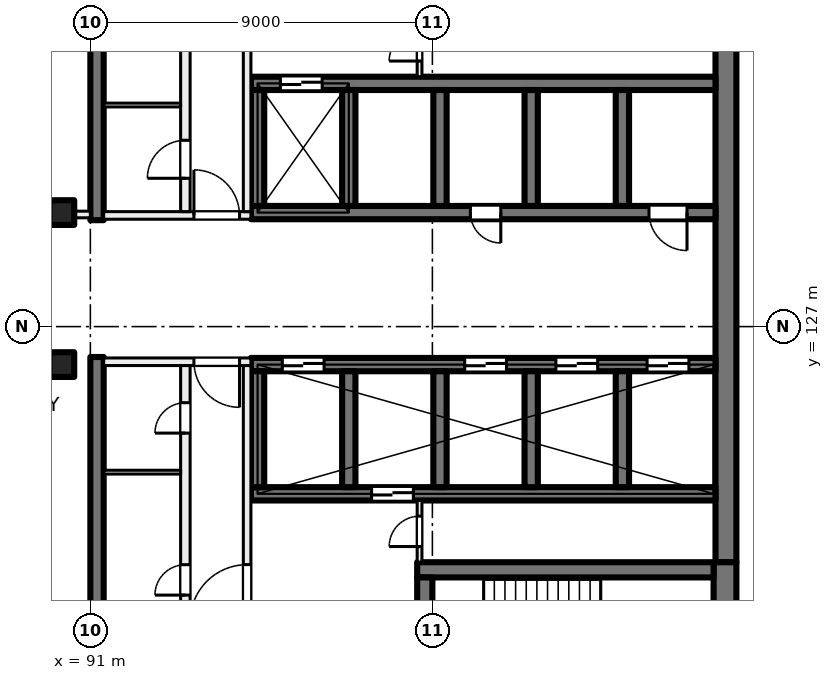
"""IFC4 building model, lengths in metres.
Left out: names, types, materials, properties, quantities, classifications, styles, units other than length and angle.
Written with IfcOpenShell. Run it as: python <this file> out.ifc"""

import sys

from ifc_helpers import new_model, si_unit, direction, frame, frame_2d, origin, origin_2d, place, context, subcontext, project, spatial, rectangle, extrude, element, fill, save


model = new_model("IFC4")
c1 = context("Model", 3, precision=1e-05, world=origin(), true_north=direction((0.0, 1.0)))
c2 = subcontext(c1, "Body", "Model", "MODEL_VIEW")
j1 = project(units=[si_unit("LENGTHUNIT", "METRE"), si_unit("PLANEANGLEUNIT", "RADIAN")], contexts=[c1])
p1 = place(None, origin())
s1 = spatial("IfcSite", under=j1, at=p1, CompositionType="ELEMENT")
p2 = place(p1, origin())
s2 = spatial("IfcBuilding", under=s1, at=p2, CompositionType="ELEMENT")
p3 = place(p2, frame((0.0, 0.0, 178.5)))
s3 = spatial("IfcBuildingStorey", under=s2, at=p3, CompositionType="ELEMENT", Elevation=178.5)
for number, where, z_axis, x_axis in (
    (1, (90.25, 130.0, 0.0), (0.0, 0.0, 1.0), (1.0, 0.0, 0.0)),
    (2, (90.25, 126.0, 0.0), (0.0, 0.0, 1.0), (1.0, 0.0, 0.0)),
):
    element("IfcColumn", number, at=place(p3, frame(where, z_axis=z_axis, x_axis=x_axis)), inside=s3, PredefinedType="COLUMN", context=c2, shape_type="SweptSolid", body=[
        extrude(rectangle(XDim=0.65, YDim=0.65, at=origin_2d()), origin(), (0.0, 0.0, 1.0), 4.0),
    ])
p4 = place(p3, frame((107.725, 135.2, 0.0), z_axis=(0.0, 0.0, 1.0), x_axis=(0.0, -1.0, 0.0)))
e3 = element("IfcWall", 3, at=p4, inside=s3, PredefinedType="SHEAR", context=c2, shape_type="SweptSolid", body=[
    extrude(rectangle(XDim=14.4, YDim=0.55, at=frame_2d((7.2, 0.0))), origin(), (0.0, 0.0, 1.0), 4.0),
])
p5 = place(p3, frame((107.7, 120.8, 0.0), z_axis=(0.0, 0.0, 1.0), x_axis=(0.0, -1.0, 0.0)))
e4 = element("IfcWall", 4, at=p5, inside=s3, PredefinedType="SHEAR", context=c2, shape_type="SweptSolid", body=[
    extrude(rectangle(XDim=3.8, YDim=0.6, at=frame_2d((1.9, 0.0))), origin(), (0.0, 0.0, 1.0), 4.0),
])
p6 = place(p3, frame((107.4, 120.6, 0.0), z_axis=(0.0, 0.0, 1.0), x_axis=(-1.0, 0.0, 0.0)))
e5 = element("IfcWall", 5, at=p6, inside=s3, PredefinedType="SHEAR", context=c2, shape_type="SweptSolid", body=[
    extrude(rectangle(XDim=7.8, YDim=0.4, at=frame_2d((3.9, 0.0))), origin(), (0.0, 0.0, 1.0), 4.0),
])
p7 = place(p3, frame((99.8, 120.4, 0.0), z_axis=(0.0, 0.0, 1.0), x_axis=(0.0, -1.0, 0.0)))
e6 = element("IfcWall", 6, at=p7, inside=s3, PredefinedType="SHEAR", context=c2, shape_type="SweptSolid", body=[
    extrude(rectangle(XDim=2.8, YDim=0.4, at=frame_2d((1.4, 0.0))), origin(), (0.0, 0.0, 1.0), 4.0),
])
p8 = place(p7, frame((0.925, 0.0, 0.0)))
e7 = element("IfcOpeningElement", 7, at=p8, cuts=e6, PredefinedType="OPENING", context=c2, shape_type="SweptSolid", body=[
    extrude(rectangle(XDim=1.0, YDim=2.1, at=frame_2d((0.5, 1.05))), frame((0.0, 0.21, 0.0), z_axis=(0.0, -1.0, 0.0), x_axis=(1.0, 0.0, 0.0)), (0.0, 0.0, 1.0), 0.42),
])
p9 = place(p3, frame((107.45, 130.0, 0.0), z_axis=(0.0, 0.0, 1.0), x_axis=(-1.0, 0.0, 0.0)))
e8 = element("IfcWall", 8, at=p9, inside=s3, PredefinedType="SHEAR", context=c2, shape_type="SweptSolid", body=[
    extrude(rectangle(XDim=12.225, YDim=0.35, at=frame_2d((6.112, 0.0))), origin(), (0.0, 0.0, 1.0), 4.0),
])
p10 = place(p9, frame((0.75, 0.0, 0.0)))
e9 = element("IfcOpeningElement", 9, at=p10, cuts=e8, PredefinedType="OPENING", context=c2, shape_type="SweptSolid", body=[
    extrude(rectangle(XDim=1.0, YDim=2.1, at=frame_2d((0.5, 1.05))), frame((0.0, 0.185, 0.0), z_axis=(0.0, -1.0, 0.0), x_axis=(1.0, 0.0, 0.0)), (0.0, 0.0, 1.0), 0.37),
])
p11 = place(p9, frame((5.65, 0.0, 0.0)))
e10 = element("IfcOpeningElement", 10, at=p11, cuts=e8, PredefinedType="OPENING", context=c2, shape_type="SweptSolid", body=[
    extrude(rectangle(XDim=0.8, YDim=2.1, at=frame_2d((0.4, 1.05))), frame((0.0, 0.185, 0.0), z_axis=(0.0, -1.0, 0.0), x_axis=(1.0, 0.0, 0.0)), (0.0, 0.0, 1.0), 0.37),
])
p12 = place(p3, frame((107.45, 133.4, 0.0), z_axis=(0.0, 0.0, 1.0), x_axis=(-1.0, 0.0, 0.0)))
e11 = element("IfcWall", 11, at=p12, inside=s3, PredefinedType="SHEAR", context=c2, shape_type="SweptSolid", body=[
    extrude(rectangle(XDim=12.225, YDim=0.35, at=frame_2d((6.112, 0.0))), origin(), (0.0, 0.0, 1.0), 4.0),
])
p13 = place(p12, frame((10.35, 0.0, 0.0)))
e12 = element("IfcOpeningElement", 12, at=p13, cuts=e11, PredefinedType="OPENING", context=c2, shape_type="SweptSolid", body=[
    extrude(rectangle(XDim=1.1, YDim=2.1, at=frame_2d((0.55, 1.05))), frame((0.0, 0.185, 0.0), z_axis=(0.0, -1.0, 0.0), x_axis=(1.0, 0.0, 0.0)), (0.0, 0.0, 1.0), 0.37),
])
for number, where, z_axis, x_axis in (
    (13, (105.0, 133.225, 0.0), (0.0, 0.0, 1.0), (0.0, -1.0, 0.0)),
    (14, (102.6, 133.225, 0.0), (0.0, 0.0, 1.0), (0.0, -1.0, 0.0)),
    (15, (100.2, 133.225, 0.0), (0.0, 0.0, 1.0), (0.0, -1.0, 0.0)),
    (16, (97.8, 133.225, 0.0), (0.0, 0.0, 1.0), (0.0, -1.0, 0.0)),
    (17, (95.4, 133.225, 0.0), (0.0, 0.0, 1.0), (0.0, -1.0, 0.0)),
):
    element("IfcWall", number, at=place(p3, frame(where, z_axis=z_axis, x_axis=x_axis)), inside=s3, PredefinedType="SHEAR", context=c2, shape_type="SweptSolid", body=[
        extrude(rectangle(XDim=3.05, YDim=0.35, at=frame_2d((1.525, 0.0))), origin(), (0.0, 0.0, 1.0), 4.0),
    ])
p14 = place(p3, frame((107.45, 126.0, 0.0), z_axis=(0.0, 0.0, 1.0), x_axis=(-1.0, 0.0, 0.0)))
e18 = element("IfcWall", 18, at=p14, inside=s3, PredefinedType="SHEAR", context=c2, shape_type="SweptSolid", body=[
    extrude(rectangle(XDim=12.225, YDim=0.35, at=frame_2d((6.112, 0.0))), origin(), (0.0, 0.0, 1.0), 4.0),
])
p15 = place(p14, frame((0.7, 0.0, 0.0)))
e19 = element("IfcOpeningElement", 19, at=p15, cuts=e18, PredefinedType="OPENING", context=c2, shape_type="SweptSolid", body=[
    extrude(rectangle(XDim=1.1, YDim=2.1, at=frame_2d((0.55, 1.05))), frame((0.0, 0.185, 0.0), z_axis=(0.0, -1.0, 0.0), x_axis=(1.0, 0.0, 0.0)), (0.0, 0.0, 1.0), 0.37),
])
p16 = place(p14, frame((3.1, 0.0, 0.0)))
e20 = element("IfcOpeningElement", 20, at=p16, cuts=e18, PredefinedType="OPENING", context=c2, shape_type="SweptSolid", body=[
    extrude(rectangle(XDim=1.1, YDim=2.1, at=frame_2d((0.55, 1.05))), frame((0.0, 0.185, 0.0), z_axis=(0.0, -1.0, 0.0), x_axis=(1.0, 0.0, 0.0)), (0.0, 0.0, 1.0), 0.37),
])
p17 = place(p14, frame((5.5, 0.0, 0.0)))
e21 = element("IfcOpeningElement", 21, at=p17, cuts=e18, PredefinedType="OPENING", context=c2, shape_type="SweptSolid", body=[
    extrude(rectangle(XDim=1.1, YDim=2.1, at=frame_2d((0.55, 1.05))), frame((0.0, 0.185, 0.0), z_axis=(0.0, -1.0, 0.0), x_axis=(1.0, 0.0, 0.0)), (0.0, 0.0, 1.0), 0.37),
])
p18 = place(p14, frame((10.3, 0.0, 0.0)))
e22 = element("IfcOpeningElement", 22, at=p18, cuts=e18, PredefinedType="OPENING", context=c2, shape_type="SweptSolid", body=[
    extrude(rectangle(XDim=1.1, YDim=2.1, at=frame_2d((0.55, 1.05))), frame((0.0, 0.185, 0.0), z_axis=(0.0, -1.0, 0.0), x_axis=(1.0, 0.0, 0.0)), (0.0, 0.0, 1.0), 0.37),
])
p19 = place(p3, frame((107.45, 122.6, 0.0), z_axis=(0.0, 0.0, 1.0), x_axis=(-1.0, 0.0, 0.0)))
e23 = element("IfcWall", 23, at=p19, inside=s3, PredefinedType="SHEAR", context=c2, shape_type="SweptSolid", body=[
    extrude(rectangle(XDim=12.225, YDim=0.35, at=frame_2d((6.112, 0.0))), origin(), (0.0, 0.0, 1.0), 4.0),
])
p20 = place(p19, frame((7.95, 0.0, 0.0)))
e24 = element("IfcOpeningElement", 24, at=p20, cuts=e23, PredefinedType="OPENING", context=c2, shape_type="SweptSolid", body=[
    extrude(rectangle(XDim=1.1, YDim=2.1, at=frame_2d((0.55, 1.05))), frame((0.0, 0.185, 0.0), z_axis=(0.0, -1.0, 0.0), x_axis=(1.0, 0.0, 0.0)), (0.0, 0.0, 1.0), 0.37),
])
for number, where, z_axis, x_axis in (
    (25, (105.0, 125.825, 0.0), (0.0, 0.0, 1.0), (0.0, -1.0, 0.0)),
    (26, (102.6, 125.825, 0.0), (0.0, 0.0, 1.0), (0.0, -1.0, 0.0)),
    (27, (100.2, 125.825, 0.0), (0.0, 0.0, 1.0), (0.0, -1.0, 0.0)),
    (28, (97.8, 125.825, 0.0), (0.0, 0.0, 1.0), (0.0, -1.0, 0.0)),
    (29, (95.4, 125.825, 0.0), (0.0, 0.0, 1.0), (0.0, -1.0, 0.0)),
):
    element("IfcWall", number, at=place(p3, frame(where, z_axis=z_axis, x_axis=x_axis)), inside=s3, PredefinedType="SHEAR", context=c2, shape_type="SweptSolid", body=[
        extrude(rectangle(XDim=3.05, YDim=0.35, at=frame_2d((1.525, 0.0))), origin(), (0.0, 0.0, 1.0), 4.0),
    ])
for number, where, z_axis, x_axis in (
    (30, (91.175, 138.45, 0.0), (0.0, 0.0, 1.0), (0.0, -1.0, 0.0)),
    (31, (91.175, 126.2, 0.0), (0.0, 0.0, 1.0), (0.0, -1.0, 0.0)),
):
    element("IfcWall", number, at=place(p3, frame(where, z_axis=z_axis, x_axis=x_axis)), inside=s3, PredefinedType="SHEAR", context=c2, shape_type="SweptSolid", body=[
        extrude(rectangle(XDim=8.65, YDim=0.35, at=frame_2d((4.325, 0.0))), origin(), (0.0, 0.0, 1.0), 4.0),
    ])
p21 = place(p3, frame((95.225, 126.075, 0.0), z_axis=(0.0, 0.0, 1.0), x_axis=(-1.0, 0.0, 0.0)))
e32 = element("IfcWall", 32, at=p21, inside=s3, PredefinedType="PARTITIONING", context=c2, shape_type="SweptSolid", body=[
    extrude(rectangle(XDim=3.875, YDim=0.2, at=frame_2d((1.938, 0.0))), origin(), (0.0, 0.0, 1.0), 3.625),
])
p22 = place(p21, frame((0.3, 0.0, 0.0)))
e33 = element("IfcOpeningElement", 33, at=p22, cuts=e32, PredefinedType="OPENING", context=c2, shape_type="SweptSolid", body=[
    extrude(rectangle(XDim=1.2, YDim=2.1, at=frame_2d((0.6, 1.05))), frame((0.0, 0.11, 0.0), z_axis=(0.0, -1.0, 0.0), x_axis=(1.0, 0.0, 0.0)), (0.0, 0.0, 1.0), 0.22),
])
p23 = place(p3, frame((95.125, 117.55, 0.0), z_axis=(0.0, 0.0, 1.0), x_axis=(0.0, 1.0, 0.0)))
e34 = element("IfcWall", 34, at=p23, inside=s3, PredefinedType="PARTITIONING", context=c2, shape_type="SweptSolid", body=[
    extrude(rectangle(XDim=8.425, YDim=0.2, at=frame_2d((4.212, 0.0))), origin(), (0.0, 0.0, 1.0), 3.625),
])
p24 = place(p23, frame((1.688, 0.0, 0.0)))
e35 = element("IfcOpeningElement", 35, at=p24, cuts=e34, PredefinedType="OPENING", context=c2, shape_type="SweptSolid", body=[
    extrude(rectangle(XDim=1.5, YDim=2.1, at=frame_2d((0.75, 1.05))), frame((0.0, 0.11, 0.0), z_axis=(0.0, -1.0, 0.0), x_axis=(1.0, 0.0, 0.0)), (0.0, 0.0, 1.0), 0.22),
])
p25 = place(p3, frame((93.5, 117.55, 0.0), z_axis=(0.0, 0.0, 1.0), x_axis=(0.0, 1.0, 0.0)))
e36 = element("IfcWall", 36, at=p25, inside=s3, PredefinedType="PARTITIONING", context=c2, shape_type="SweptSolid", body=[
    extrude(rectangle(XDim=8.425, YDim=0.25, at=frame_2d((4.212, 0.0))), origin(), (0.0, 0.0, 1.0), 3.625),
])
p26 = place(p25, frame((6.647, 0.0, 0.0)))
e37 = element("IfcOpeningElement", 37, at=p26, cuts=e36, PredefinedType="OPENING", context=c2, shape_type="SweptSolid", body=[
    extrude(rectangle(XDim=0.8, YDim=2.1, at=frame_2d((0.4, 1.05))), frame((0.0, 0.135, 0.0), z_axis=(0.0, -1.0, 0.0), x_axis=(1.0, 0.0, 0.0)), (0.0, 0.0, 1.0), 0.27),
])
p27 = place(p25, frame((2.385, 0.0, 0.0)))
e38 = element("IfcOpeningElement", 38, at=p27, cuts=e36, PredefinedType="OPENING", context=c2, shape_type="SweptSolid", body=[
    extrude(rectangle(XDim=0.8, YDim=2.1, at=frame_2d((0.4, 1.05))), frame((0.0, 0.135, 0.0), z_axis=(0.0, -1.0, 0.0), x_axis=(1.0, 0.0, 0.0)), (0.0, 0.0, 1.0), 0.27),
])
p28 = place(p3, frame((99.663, 120.8, 0.0), z_axis=(0.0, 0.0, 1.0), x_axis=(0.0, 1.0, 0.0)))
e39 = element("IfcWall", 39, at=p28, inside=s3, PredefinedType="PARTITIONING", context=c2, shape_type="SweptSolid", body=[
    extrude(rectangle(XDim=1.625, YDim=0.125, at=frame_2d((0.812, 0.0))), origin(), (0.0, 0.0, 1.0), 3.625),
])
p29 = place(p28, frame((0.413, 0.0, 0.0)))
e40 = element("IfcOpeningElement", 40, at=p29, cuts=e39, PredefinedType="OPENING", context=c2, shape_type="SweptSolid", body=[
    extrude(rectangle(XDim=0.8, YDim=2.1, at=frame_2d((0.4, 1.05))), frame((0.0, 0.073, 0.0), z_axis=(0.0, -1.0, 0.0), x_axis=(1.0, 0.0, 0.0)), (0.0, 0.0, 1.0), 0.145),
])
p30 = place(p3, frame((93.375, 123.17, 0.0), z_axis=(0.0, 0.0, 1.0), x_axis=(-1.0, 0.0, 0.0)))
e41 = element("IfcWall", 41, at=p30, inside=s3, PredefinedType="PARTITIONING", context=c2, shape_type="SweptSolid", body=[
    extrude(rectangle(XDim=2.025, YDim=0.1, at=frame_2d((1.012, 0.0))), origin(), (0.0, 0.0, 1.0), 3.625),
])
p31 = place(p3, frame((91.35, 129.925, 0.0), z_axis=(0.0, 0.0, 1.0), x_axis=(1.0, 0.0, 0.0)))
e42 = element("IfcWall", 42, at=p31, inside=s3, PredefinedType="PARTITIONING", context=c2, shape_type="SweptSolid", body=[
    extrude(rectangle(XDim=3.875, YDim=0.2, at=frame_2d((1.938, 0.0))), origin(), (0.0, 0.0, 1.0), 3.625),
])
p32 = place(p31, frame((2.375, 0.0, 0.0)))
e43 = element("IfcOpeningElement", 43, at=p32, cuts=e42, PredefinedType="OPENING", context=c2, shape_type="SweptSolid", body=[
    extrude(rectangle(XDim=1.2, YDim=2.1, at=frame_2d((0.6, 1.05))), frame((0.0, 0.11, 0.0), z_axis=(0.0, -1.0, 0.0), x_axis=(1.0, 0.0, 0.0)), (0.0, 0.0, 1.0), 0.22),
])
p33 = place(p3, frame((95.125, 130.025, 0.0), z_axis=(0.0, 0.0, 1.0), x_axis=(0.0, 1.0, 0.0)))
e44 = element("IfcWall", 44, at=p33, inside=s3, PredefinedType="PARTITIONING", context=c2, shape_type="SweptSolid", body=[
    extrude(rectangle(XDim=8.425, YDim=0.2, at=frame_2d((4.212, 0.0))), origin(), (0.0, 0.0, 1.0), 3.625),
])
p34 = place(p33, frame((5.238, 0.0, 0.0)))
e45 = element("IfcOpeningElement", 45, at=p34, cuts=e44, PredefinedType="OPENING", context=c2, shape_type="SweptSolid", body=[
    extrude(rectangle(XDim=1.5, YDim=2.1, at=frame_2d((0.75, 1.05))), frame((0.0, 0.11, 0.0), z_axis=(0.0, -1.0, 0.0), x_axis=(1.0, 0.0, 0.0)), (0.0, 0.0, 1.0), 0.22),
])
p35 = place(p3, frame((93.5, 130.025, 0.0), z_axis=(0.0, 0.0, 1.0), x_axis=(0.0, 1.0, 0.0)))
e46 = element("IfcWall", 46, at=p35, inside=s3, PredefinedType="PARTITIONING", context=c2, shape_type="SweptSolid", body=[
    extrude(rectangle(XDim=8.425, YDim=0.25, at=frame_2d((4.212, 0.0))), origin(), (0.0, 0.0, 1.0), 3.625),
])
p36 = place(p35, frame((0.877, 0.0, 0.0)))
e47 = element("IfcOpeningElement", 47, at=p36, cuts=e46, PredefinedType="OPENING", context=c2, shape_type="SweptSolid", body=[
    extrude(rectangle(XDim=1.0, YDim=2.1, at=frame_2d((0.5, 1.05))), frame((0.0, 0.135, 0.0), z_axis=(0.0, -1.0, 0.0), x_axis=(1.0, 0.0, 0.0)), (0.0, 0.0, 1.0), 0.27),
])
p37 = place(p35, frame((5.24, 0.0, 0.0)))
e48 = element("IfcOpeningElement", 48, at=p37, cuts=e46, PredefinedType="OPENING", context=c2, shape_type="SweptSolid", body=[
    extrude(rectangle(XDim=0.8, YDim=2.1, at=frame_2d((0.4, 1.05))), frame((0.0, 0.135, 0.0), z_axis=(0.0, -1.0, 0.0), x_axis=(1.0, 0.0, 0.0)), (0.0, 0.0, 1.0), 0.27),
])
p38 = place(p3, frame((99.663, 133.575, 0.0), z_axis=(0.0, 0.0, 1.0), x_axis=(0.0, 1.0, 0.0)))
e49 = element("IfcWall", 49, at=p38, inside=s3, PredefinedType="PARTITIONING", context=c2, shape_type="SweptSolid", body=[
    extrude(rectangle(XDim=1.625, YDim=0.125, at=frame_2d((0.812, 0.0))), origin(), (0.0, 0.0, 1.0), 3.625),
])
p39 = place(p38, frame((0.413, 0.0, 0.0)))
e50 = element("IfcOpeningElement", 50, at=p39, cuts=e49, PredefinedType="OPENING", context=c2, shape_type="SweptSolid", body=[
    extrude(rectangle(XDim=0.8, YDim=2.1, at=frame_2d((0.4, 1.05))), frame((0.0, 0.073, 0.0), z_axis=(0.0, -1.0, 0.0), x_axis=(1.0, 0.0, 0.0)), (0.0, 0.0, 1.0), 0.145),
])
p40 = place(p3, frame((91.35, 132.83, 0.0), z_axis=(0.0, 0.0, 1.0), x_axis=(1.0, 0.0, 0.0)))
e51 = element("IfcWall", 51, at=p40, inside=s3, PredefinedType="PARTITIONING", context=c2, shape_type="SweptSolid", body=[
    extrude(rectangle(XDim=2.025, YDim=0.1, at=frame_2d((1.012, 0.0))), origin(), (0.0, 0.0, 1.0), 3.625),
])
p41 = place(p3, frame((85.838, 129.95, 0.0), z_axis=(0.0, 0.0, 1.0), x_axis=(1.0, 0.0, 0.0)))
e52 = element("IfcWall", 52, at=p41, inside=s3, PredefinedType="PARTITIONING", context=c2, shape_type="SweptSolid", body=[
    extrude(rectangle(XDim=5.162, YDim=0.175, at=frame_2d((2.581, 0.0))), origin(), (0.0, 0.0, 1.0), 3.625),
])
p42 = place(p41, frame((1.971, 0.0, 0.0)))
e53 = element("IfcOpeningElement", 53, at=p42, cuts=e52, PredefinedType="OPENING", context=c2, shape_type="SweptSolid", body=[
    extrude(rectangle(XDim=1.2, YDim=2.1, at=frame_2d((0.6, 1.05))), frame((0.0, 0.097, 0.0), z_axis=(0.0, -1.0, 0.0), x_axis=(1.0, 0.0, 0.0)), (0.0, 0.0, 1.0), 0.195),
])
p43 = place(p15, origin())
e54 = element("IfcDoor", 54, at=p43, inside=s3, OperationType="DOUBLE_DOOR_SLIDING", PredefinedType="DOOR", context=c2, shape_type="SweptSolid", body=[
    extrude(rectangle(XDim=1.1, YDim=2.1, at=frame_2d((0.55, 1.05))), frame((0.0, 0.025, 0.0), z_axis=(0.0, -1.0, 0.0), x_axis=(1.0, 0.0, 0.0)), (0.0, 0.0, 1.0), 0.05),
])
fill(e19, e54)
p44 = place(p16, origin())
e55 = element("IfcDoor", 55, at=p44, inside=s3, OperationType="DOUBLE_DOOR_SLIDING", PredefinedType="DOOR", context=c2, shape_type="SweptSolid", body=[
    extrude(rectangle(XDim=1.1, YDim=2.1, at=frame_2d((0.55, 1.05))), frame((0.0, 0.025, 0.0), z_axis=(0.0, -1.0, 0.0), x_axis=(1.0, 0.0, 0.0)), (0.0, 0.0, 1.0), 0.05),
])
fill(e20, e55)
p45 = place(p17, origin())
e56 = element("IfcDoor", 56, at=p45, inside=s3, OperationType="DOUBLE_DOOR_SLIDING", PredefinedType="DOOR", context=c2, shape_type="SweptSolid", body=[
    extrude(rectangle(XDim=1.1, YDim=2.1, at=frame_2d((0.55, 1.05))), frame((0.0, 0.025, 0.0), z_axis=(0.0, -1.0, 0.0), x_axis=(1.0, 0.0, 0.0)), (0.0, 0.0, 1.0), 0.05),
])
fill(e21, e56)
p46 = place(p18, origin())
e57 = element("IfcDoor", 57, at=p46, inside=s3, OperationType="DOUBLE_DOOR_SLIDING", PredefinedType="DOOR", context=c2, shape_type="SweptSolid", body=[
    extrude(rectangle(XDim=1.1, YDim=2.1, at=frame_2d((0.55, 1.05))), frame((0.0, 0.025, 0.0), z_axis=(0.0, -1.0, 0.0), x_axis=(1.0, 0.0, 0.0)), (0.0, 0.0, 1.0), 0.05),
])
fill(e22, e57)
p47 = place(p10, origin())
e58 = element("IfcDoor", 58, at=p47, inside=s3, OperationType="SINGLE_SWING_LEFT", PredefinedType="DOOR", context=c2, shape_type="SweptSolid", body=[
    extrude(rectangle(XDim=1.0, YDim=2.1, at=frame_2d((0.5, 1.05))), frame((0.0, 0.025, 0.0), z_axis=(0.0, -1.0, 0.0), x_axis=(1.0, 0.0, 0.0)), (0.0, 0.0, 1.0), 0.05),
])
fill(e9, e58)
p48 = place(p11, origin())
e59 = element("IfcDoor", 59, at=p48, inside=s3, OperationType="SINGLE_SWING_RIGHT", PredefinedType="DOOR", context=c2, shape_type="SweptSolid", body=[
    extrude(rectangle(XDim=0.8, YDim=2.1, at=frame_2d((0.4, 1.05))), frame((0.0, 0.025, 0.0), z_axis=(0.0, -1.0, 0.0), x_axis=(1.0, 0.0, 0.0)), (0.0, 0.0, 1.0), 0.05),
])
fill(e10, e59)
p49 = place(p22, origin())
e60 = element("IfcDoor", 60, at=p49, inside=s3, OperationType="DOUBLE_DOOR_SINGLE_SWING", PredefinedType="DOOR", context=c2, shape_type="SweptSolid", body=[
    extrude(rectangle(XDim=1.2, YDim=2.1, at=frame_2d((0.6, 1.05))), frame((0.0, 0.025, 0.0), z_axis=(0.0, -1.0, 0.0), x_axis=(1.0, 0.0, 0.0)), (0.0, 0.0, 1.0), 0.05),
])
fill(e33, e60)
p50 = place(p24, origin())
e61 = element("IfcDoor", 61, at=p50, inside=s3, OperationType="DOUBLE_DOOR_SINGLE_SWING", PredefinedType="DOOR", context=c2, shape_type="SweptSolid", body=[
    extrude(rectangle(XDim=1.5, YDim=2.1, at=frame_2d((0.75, 1.05))), frame((0.0, 0.025, 0.0), z_axis=(0.0, -1.0, 0.0), x_axis=(1.0, 0.0, 0.0)), (0.0, 0.0, 1.0), 0.05),
])
fill(e35, e61)
p51 = place(p29, origin())
e62 = element("IfcDoor", 62, at=p51, inside=s3, OperationType="SINGLE_SWING_RIGHT", PredefinedType="DOOR", context=c2, shape_type="SweptSolid", body=[
    extrude(rectangle(XDim=0.8, YDim=2.1, at=frame_2d((0.4, 1.05))), frame((0.0, 0.025, 0.0), z_axis=(0.0, -1.0, 0.0), x_axis=(1.0, 0.0, 0.0)), (0.0, 0.0, 1.0), 0.05),
])
fill(e40, e62)
p52 = place(p26, origin())
e63 = element("IfcDoor", 63, at=p52, inside=s3, OperationType="SINGLE_SWING_LEFT", PredefinedType="DOOR", context=c2, shape_type="SweptSolid", body=[
    extrude(rectangle(XDim=0.8, YDim=2.1, at=frame_2d((0.4, 1.05))), frame((0.0, 0.025, 0.0), z_axis=(0.0, -1.0, 0.0), x_axis=(1.0, 0.0, 0.0)), (0.0, 0.0, 1.0), 0.05),
])
fill(e37, e63)
p53 = place(p27, origin())
e64 = element("IfcDoor", 64, at=p53, inside=s3, OperationType="SINGLE_SWING_RIGHT", PredefinedType="DOOR", context=c2, shape_type="SweptSolid", body=[
    extrude(rectangle(XDim=0.8, YDim=2.1, at=frame_2d((0.4, 1.05))), frame((0.0, 0.025, 0.0), z_axis=(0.0, -1.0, 0.0), x_axis=(1.0, 0.0, 0.0)), (0.0, 0.0, 1.0), 0.05),
])
fill(e38, e64)
p54 = place(p32, origin())
e65 = element("IfcDoor", 65, at=p54, inside=s3, OperationType="DOUBLE_DOOR_SINGLE_SWING", PredefinedType="DOOR", context=c2, shape_type="SweptSolid", body=[
    extrude(rectangle(XDim=1.2, YDim=2.1, at=frame_2d((0.6, 1.05))), frame((0.0, 0.025, 0.0), z_axis=(0.0, -1.0, 0.0), x_axis=(1.0, 0.0, 0.0)), (0.0, 0.0, 1.0), 0.05),
])
fill(e43, e65)
p55 = place(p39, origin())
e66 = element("IfcDoor", 66, at=p55, inside=s3, OperationType="SINGLE_SWING_LEFT", PredefinedType="DOOR", context=c2, shape_type="SweptSolid", body=[
    extrude(rectangle(XDim=0.8, YDim=2.1, at=frame_2d((0.4, 1.05))), frame((0.0, 0.025, 0.0), z_axis=(0.0, -1.0, 0.0), x_axis=(1.0, 0.0, 0.0)), (0.0, 0.0, 1.0), 0.05),
])
fill(e50, e66)
p56 = place(p36, origin())
e67 = element("IfcDoor", 67, at=p56, inside=s3, OperationType="SINGLE_SWING_RIGHT", PredefinedType="DOOR", context=c2, shape_type="SweptSolid", body=[
    extrude(rectangle(XDim=1.0, YDim=2.1, at=frame_2d((0.5, 1.05))), frame((0.0, 0.025, 0.0), z_axis=(0.0, -1.0, 0.0), x_axis=(1.0, 0.0, 0.0)), (0.0, 0.0, 1.0), 0.05),
])
fill(e47, e67)
p57 = place(p13, origin())
e68 = element("IfcDoor", 68, at=p57, inside=s3, OperationType="DOUBLE_DOOR_SLIDING", PredefinedType="DOOR", context=c2, shape_type="SweptSolid", body=[
    extrude(rectangle(XDim=1.1, YDim=2.1, at=frame_2d((0.55, 1.05))), frame((0.0, 0.025, 0.0), z_axis=(0.0, -1.0, 0.0), x_axis=(1.0, 0.0, 0.0)), (0.0, 0.0, 1.0), 0.05),
])
fill(e12, e68)
p58 = place(p20, origin())
e69 = element("IfcDoor", 69, at=p58, inside=s3, OperationType="DOUBLE_DOOR_SLIDING", PredefinedType="DOOR", context=c2, shape_type="SweptSolid", body=[
    extrude(rectangle(XDim=1.1, YDim=2.1, at=frame_2d((0.55, 1.05))), frame((0.0, 0.025, 0.0), z_axis=(0.0, -1.0, 0.0), x_axis=(1.0, 0.0, 0.0)), (0.0, 0.0, 1.0), 0.05),
])
fill(e24, e69)
save(model, sys.argv[1])
